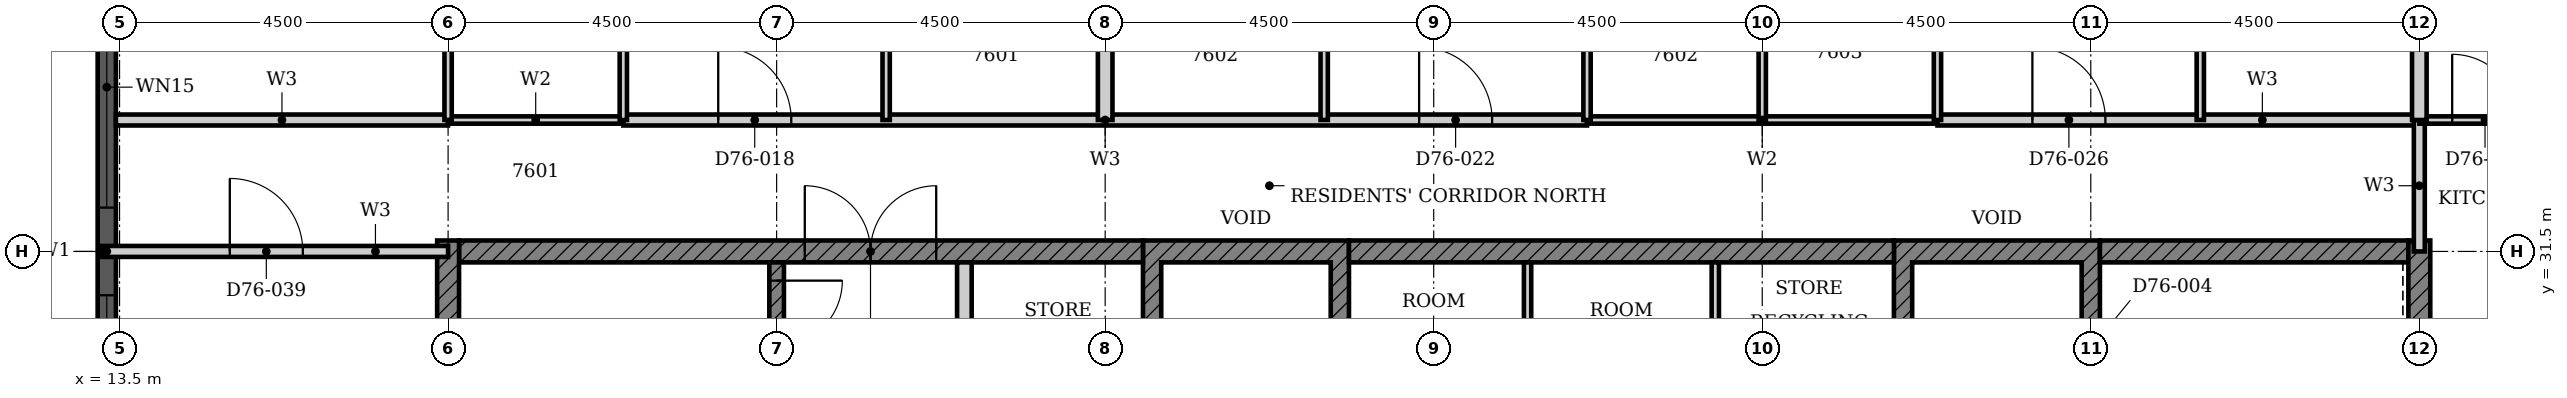
"""IFC4 building model, lengths in metres.
Left out: names, types, materials, properties, quantities, classifications, styles, units other than length and angle.
Written with IfcOpenShell. Run it as: python <this file> out.ifc"""

import sys

from ifc_helpers import new_model, si_unit, direction, frame, frame_2d, origin, place, context, subcontext, project, spatial, polyline, rectangle, outline, extrude, element, fill, save


model = new_model("IFC4")
c1 = context("Model", 3, precision=1e-05, world=origin(), true_north=direction((0.0, 1.0)))
c2 = subcontext(c1, "Body", "Model", "MODEL_VIEW")
j1 = project(units=[si_unit("LENGTHUNIT", "METRE"), si_unit("PLANEANGLEUNIT", "RADIAN")], contexts=[c1])
p1 = place(None, origin())
s1 = spatial("IfcSite", under=j1, at=p1, CompositionType="ELEMENT")
p2 = place(p1, origin())
s2 = spatial("IfcBuilding", under=s1, at=p2, CompositionType="ELEMENT")
p3 = place(p2, frame((0.0, 0.0, 298.2)))
s3 = spatial("IfcBuildingStorey", under=s2, at=p3, CompositionType="ELEMENT", Elevation=298.2)
p4 = place(p3, frame((13.325, 35.7, 0.0), z_axis=(0.0, 0.0, 1.0), x_axis=(0.0, -1.0, 0.0)))
e1 = element("IfcWall", 1, at=p4, inside=s3, PredefinedType="SOLIDWALL", context=c2, shape_type="SweptSolid", body=[
    extrude(rectangle(XDim=8.4, YDim=0.25, at=frame_2d((4.2, 0.0))), origin(), (0.0, 0.0, 1.0), 3.7),
])
p5 = place(p4, frame((0.3, 0.0, 0.45)))
e2 = element("IfcOpeningElement", 2, at=p5, cuts=e1, PredefinedType="OPENING", context=c2, shape_type="SweptSolid", body=[
    extrude(rectangle(XDim=3.3, YDim=2.3, at=frame_2d((1.65, 1.15))), frame((0.0, 0.135, 0.0), z_axis=(0.0, -1.0, 0.0), x_axis=(1.0, 0.0, 0.0)), (0.0, 0.0, 1.0), 0.27),
])
p6 = place(p4, frame((4.8, 0.0, 0.45)))
e3 = element("IfcOpeningElement", 3, at=p6, cuts=e1, PredefinedType="OPENING", context=c2, shape_type="SweptSolid", body=[
    extrude(rectangle(XDim=3.3, YDim=2.3, at=frame_2d((1.65, 1.15))), frame((0.0, 0.135, 0.0), z_axis=(0.0, -1.0, 0.0), x_axis=(1.0, 0.0, 0.0)), (0.0, 0.0, 1.0), 0.27),
])
p7 = place(p3, origin())
e4 = element("IfcWall", 4, at=p7, inside=s3, PredefinedType="SHEAR", context=c2, shape_type="SweptSolid", body=[
    extrude(outline(polyline([(27.518, 28.725), (27.768, 28.725), (27.768, 31.35), (30.089, 31.35), (30.089, 28.725), (30.339, 28.725), (30.339, 31.65), (27.518, 31.65), (27.518, 28.725)])), origin(), (0.0, 0.0, 1.0), 3.4),
])
p8 = place(p3, origin())
e5 = element("IfcWall", 5, at=p8, inside=s3, PredefinedType="SHEAR", context=c2, shape_type="SweptSolid", body=[
    extrude(outline(polyline([(37.803, 28.725), (38.053, 28.725), (38.053, 31.35), (40.375, 31.35), (40.375, 28.725), (40.625, 28.725), (40.625, 31.65), (37.803, 31.65), (37.803, 28.725)])), origin(), (0.0, 0.0, 1.0), 3.4),
])
p9 = place(p3, frame((18.15, 31.5, 0.0), z_axis=(0.0, 0.0, 1.0), x_axis=(1.0, 0.0, 0.0)))
e6 = element("IfcWall", 6, at=p9, inside=s3, PredefinedType="SHEAR", context=c2, shape_type="SweptSolid", body=[
    extrude(rectangle(XDim=9.368, YDim=0.3, at=frame_2d((4.684, 0.0))), origin(), (0.0, 0.0, 1.0), 3.4),
])
p10 = place(p9, frame((4.736, 0.0, 0.0)))
e7 = element("IfcOpeningElement", 7, at=p10, cuts=e6, PredefinedType="OPENING", context=c2, shape_type="SweptSolid", body=[
    extrude(rectangle(XDim=1.8, YDim=2.1, at=frame_2d((0.9, 1.05))), frame((0.0, 0.16, 0.0), z_axis=(0.0, -1.0, 0.0), x_axis=(1.0, 0.0, 0.0)), (0.0, 0.0, 1.0), 0.32),
])
p11 = place(p3, frame((30.339, 31.5, 0.0), z_axis=(0.0, 0.0, 1.0), x_axis=(1.0, 0.0, 0.0)))
e8 = element("IfcWall", 8, at=p11, inside=s3, PredefinedType="SHEAR", context=c2, shape_type="SweptSolid", body=[
    extrude(rectangle(XDim=7.464, YDim=0.3, at=frame_2d((3.732, 0.0))), origin(), (0.0, 0.0, 1.0), 3.4),
])
p12 = place(p3, frame((40.625, 31.5, 0.0), z_axis=(0.0, 0.0, 1.0), x_axis=(1.0, 0.0, 0.0)))
e9 = element("IfcWall", 9, at=p12, inside=s3, PredefinedType="SHEAR", context=c2, shape_type="SweptSolid", body=[
    extrude(rectangle(XDim=4.225, YDim=0.3, at=frame_2d((2.113, 0.0))), origin(), (0.0, 0.0, 1.0), 3.4),
])
for number, where, z_axis, x_axis in (
    (10, (18.0, 22.35, 0.0), (0.0, 0.0, 1.0), (0.0, 1.0, 0.0)),
    (11, (45.0, 22.35, 0.0), (0.0, 0.0, 1.0), (0.0, 1.0, 0.0)),
):
    element("IfcWall", number, at=place(p3, frame(where, z_axis=z_axis, x_axis=x_axis)), inside=s3, PredefinedType="SHEAR", context=c2, shape_type="SweptSolid", body=[
        extrude(rectangle(XDim=9.3, YDim=0.3, at=frame_2d((4.65, 0.0))), origin(), (0.0, 0.0, 1.0), 3.4),
    ])
p13 = place(p3, frame((25.072, 28.725, 0.0), z_axis=(0.0, 0.0, 1.0), x_axis=(0.0, 1.0, 0.0)))
e12 = element("IfcWall", 12, at=p13, inside=s3, PredefinedType="PARTITIONING", context=c2, shape_type="SweptSolid", body=[
    extrude(rectangle(XDim=2.625, YDim=0.2, at=frame_2d((1.312, 0.0))), origin(), (0.0, 0.0, 1.0), 3.4),
])
for number, where, z_axis, x_axis in (
    (13, (32.786, 28.725, 0.0), (0.0, 0.0, 1.0), (0.0, 1.0, 0.0)),
    (14, (35.357, 28.725, 0.0), (0.0, 0.0, 1.0), (0.0, 1.0, 0.0)),
):
    element("IfcWall", number, at=place(p3, frame(where, z_axis=z_axis, x_axis=x_axis)), inside=s3, PredefinedType="PARTITIONING", context=c2, shape_type="SweptSolid", body=[
        extrude(rectangle(XDim=2.625, YDim=0.1, at=frame_2d((1.312, 0.0))), origin(), (0.0, 0.0, 1.0), 3.4),
    ])
p14 = place(p3, frame((22.5, 31.35, 0.0), z_axis=(0.0, 0.0, 1.0), x_axis=(0.0, -1.0, 0.0)))
e15 = element("IfcWall", 15, at=p14, inside=s3, PredefinedType="SHEAR", context=c2, shape_type="SweptSolid", body=[
    extrude(rectangle(XDim=5.825, YDim=0.2, at=frame_2d((2.913, 0.0))), origin(), (0.0, 0.0, 1.0), 3.4),
])
p15 = place(p14, frame((0.25, 0.0, 0.0)))
e16 = element("IfcOpeningElement", 16, at=p15, cuts=e15, PredefinedType="OPENING", context=c2, shape_type="SweptSolid", body=[
    extrude(rectangle(XDim=1.8, YDim=2.1, at=frame_2d((0.9, 1.05))), frame((0.0, 0.11, 0.0), z_axis=(0.0, -1.0, 0.0), x_axis=(1.0, 0.0, 0.0)), (0.0, 0.0, 1.0), 0.22),
])
p16 = place(p3, frame((13.26, 31.5, 0.0), z_axis=(0.0, 0.0, 1.0), x_axis=(1.0, 0.0, 0.0)))
e17 = element("IfcWall", 17, at=p16, inside=s3, PredefinedType="PARTITIONING", context=c2, shape_type="SweptSolid", body=[
    extrude(rectangle(XDim=4.74, YDim=0.15, at=frame_2d((2.37, 0.0))), origin(), (0.0, 0.0, 1.0), 3.4),
])
p17 = place(p16, frame((1.75, 0.0, 0.0)))
e18 = element("IfcOpeningElement", 18, at=p17, cuts=e17, PredefinedType="OPENING", context=c2, shape_type="SweptSolid", body=[
    extrude(rectangle(XDim=1.0, YDim=2.2, at=frame_2d((0.5, 1.1))), frame((0.0, 0.085, 0.0), z_axis=(0.0, -1.0, 0.0), x_axis=(1.0, 0.0, 0.0)), (0.0, 0.0, 1.0), 0.17),
])
p18 = place(p3, frame((13.45, 33.3, 0.0), z_axis=(0.0, 0.0, 1.0), x_axis=(1.0, 0.0, 0.0)))
e19 = element("IfcWall", 19, at=p18, inside=s3, PredefinedType="PARTITIONING", context=c2, shape_type="SweptSolid", body=[
    extrude(rectangle(XDim=4.549, YDim=0.15, at=frame_2d((2.274, 0.0))), origin(), (0.0, 0.0, 1.0), 3.4),
])
p19 = place(p3, frame((20.4, 33.3, 0.0), z_axis=(0.0, 0.0, 1.0), x_axis=(1.0, 0.0, 0.0)))
e20 = element("IfcWall", 20, at=p19, inside=s3, PredefinedType="PARTITIONING", context=c2, shape_type="SweptSolid", body=[
    extrude(rectangle(XDim=13.2, YDim=0.15, at=frame_2d((6.6, 0.0))), origin(), (0.0, 0.0, 1.0), 3.4),
])
p20 = place(p19, frame((1.3, 0.0, 0.0)))
e21 = element("IfcOpeningElement", 21, at=p20, cuts=e20, PredefinedType="OPENING", context=c2, shape_type="SweptSolid", body=[
    extrude(rectangle(XDim=1.0, YDim=2.2, at=frame_2d((0.5, 1.1))), frame((0.0, 0.085, 0.0), z_axis=(0.0, -1.0, 0.0), x_axis=(1.0, 0.0, 0.0)), (0.0, 0.0, 1.0), 0.17),
])
p21 = place(p19, frame((10.9, 0.0, 0.0)))
e22 = element("IfcOpeningElement", 22, at=p21, cuts=e20, PredefinedType="OPENING", context=c2, shape_type="SweptSolid", body=[
    extrude(rectangle(XDim=1.0, YDim=2.2, at=frame_2d((0.5, 1.1))), frame((0.0, 0.085, 0.0), z_axis=(0.0, -1.0, 0.0), x_axis=(1.0, 0.0, 0.0)), (0.0, 0.0, 1.0), 0.17),
])
p22 = place(p3, frame((38.4, 33.3, 0.0), z_axis=(0.0, 0.0, 1.0), x_axis=(1.0, 0.0, 0.0)))
e23 = element("IfcWall", 23, at=p22, inside=s3, PredefinedType="PARTITIONING", context=c2, shape_type="SweptSolid", body=[
    extrude(rectangle(XDim=6.6, YDim=0.15, at=frame_2d((3.3, 0.0))), origin(), (0.0, 0.0, 1.0), 3.4),
])
p23 = place(p22, frame((1.3, 0.0, 0.0)))
e24 = element("IfcOpeningElement", 24, at=p23, cuts=e23, PredefinedType="OPENING", context=c2, shape_type="SweptSolid", body=[
    extrude(rectangle(XDim=1.0, YDim=2.2, at=frame_2d((0.5, 1.1))), frame((0.0, 0.085, 0.0), z_axis=(0.0, -1.0, 0.0), x_axis=(1.0, 0.0, 0.0)), (0.0, 0.0, 1.0), 0.17),
])
p24 = place(p3, frame((45.0, 31.5, 0.0), z_axis=(0.0, 0.0, 1.0), x_axis=(0.0, 1.0, 0.0)))
e25 = element("IfcWall", 25, at=p24, inside=s3, PredefinedType="PARTITIONING", context=c2, shape_type="SweptSolid", body=[
    extrude(rectangle(XDim=1.8, YDim=0.15, at=frame_2d((0.9, 0.0))), origin(), (0.0, 0.0, 1.0), 3.4),
])
p25 = place(p3, frame((45.0, 33.3, 0.0), z_axis=(0.0, 0.0, 1.0), x_axis=(1.0, 0.0, 0.0)))
e26 = element("IfcWall", 26, at=p25, inside=s3, PredefinedType="PARTITIONING", context=c2, shape_type="SweptSolid", body=[
    extrude(rectangle(XDim=1.8, YDim=0.1, at=frame_2d((0.9, 0.0))), origin(), (0.0, 0.0, 1.0), 3.4),
])
p26 = place(p25, frame((0.45, 0.0, 0.0)))
e27 = element("IfcOpeningElement", 27, at=p26, cuts=e26, PredefinedType="OPENING", context=c2, shape_type="SweptSolid", body=[
    extrude(rectangle(XDim=0.9, YDim=2.1, at=frame_2d((0.45, 1.05))), frame((0.0, 0.06, 0.0), z_axis=(0.0, -1.0, 0.0), x_axis=(1.0, 0.0, 0.0)), (0.0, 0.0, 1.0), 0.12),
])
for number, where, z_axis, x_axis in (
    (28, (24.0, 33.3, 0.0), (0.0, 0.0, 1.0), (0.0, 1.0, 0.0)),
    (29, (30.0, 33.3, 0.0), (0.0, 0.0, 1.0), (0.0, 1.0, 0.0)),
    (30, (42.0, 33.3, 0.0), (0.0, 0.0, 1.0), (0.0, 1.0, 0.0)),
):
    element("IfcWall", number, at=place(p3, frame(where, z_axis=z_axis, x_axis=x_axis)), inside=s3, PredefinedType="PARTITIONING", context=c2, shape_type="SweptSolid", body=[
        extrude(rectangle(XDim=2.7, YDim=0.1, at=frame_2d((1.35, 0.0))), origin(), (0.0, 0.0, 1.0), 3.4),
    ])
p27 = place(p3, frame((27.0, 33.3, 0.0), z_axis=(0.0, 0.0, 1.0), x_axis=(0.0, 1.0, 0.0)))
e31 = element("IfcWall", 31, at=p27, inside=s3, PredefinedType="PARTITIONING", context=c2, shape_type="SweptSolid", body=[
    extrude(rectangle(XDim=7.39, YDim=0.2, at=frame_2d((3.695, 0.0))), origin(), (0.0, 0.0, 1.0), 3.4),
])
p28 = place(p3, frame((45.0, 33.3, 0.0), z_axis=(0.0, 0.0, 1.0), x_axis=(0.0, 1.0, 0.0)))
e32 = element("IfcWall", 32, at=p28, inside=s3, PredefinedType="PARTITIONING", context=c2, shape_type="SweptSolid", body=[
    extrude(rectangle(XDim=4.9, YDim=0.2, at=frame_2d((2.45, 0.0))), origin(), (0.0, 0.0, 1.0), 3.4),
])
p29 = place(p3, frame((18.0, 33.3, 0.0), z_axis=(0.0, 0.0, 1.0), x_axis=(1.0, 0.0, 0.0)))
e33 = element("IfcWall", 33, at=p29, inside=s3, PredefinedType="PARTITIONING", context=c2, shape_type="SweptSolid", body=[
    extrude(rectangle(XDim=2.4, YDim=0.1, at=frame_2d((1.2, 0.0))), origin(), (0.0, 0.0, 1.0), 3.4),
])
p30 = place(p3, frame((33.6, 33.3, 0.0), z_axis=(0.0, 0.0, 1.0), x_axis=(1.0, 0.0, 0.0)))
e34 = element("IfcWall", 34, at=p30, inside=s3, PredefinedType="PARTITIONING", context=c2, shape_type="SweptSolid", body=[
    extrude(rectangle(XDim=4.8, YDim=0.1, at=frame_2d((2.4, 0.0))), origin(), (0.0, 0.0, 1.0), 3.4),
])
p31 = place(p3, frame((18.0, 33.301, 0.0), z_axis=(0.0, 0.0, 1.0), x_axis=(0.0, 1.0, 0.0)))
e35 = element("IfcWall", 35, at=p31, inside=s3, PredefinedType="PARTITIONING", context=c2, shape_type="SweptSolid", body=[
    extrude(rectangle(XDim=2.699, YDim=0.1, at=frame_2d((1.35, 0.0))), origin(), (0.0, 0.0, 1.0), 3.4),
])
p32 = place(p3, frame((20.4, 33.3, 0.0), z_axis=(0.0, 0.0, 1.0), x_axis=(0.0, 1.0, 0.0)))
e36 = element("IfcWall", 36, at=p32, inside=s3, PredefinedType="PARTITIONING", context=c2, shape_type="SweptSolid", body=[
    extrude(rectangle(XDim=2.7, YDim=0.1, at=frame_2d((1.35, 0.0))), origin(), (0.0, 0.0, 1.0), 3.4),
])
p33 = place(p32, frame((0.95, 0.0, 0.0)))
e37 = element("IfcOpeningElement", 37, at=p33, cuts=e36, PredefinedType="OPENING", context=c2, shape_type="SweptSolid", body=[
    extrude(rectangle(XDim=0.8, YDim=2.1, at=frame_2d((0.4, 1.05))), frame((0.0, 0.06, 0.0), z_axis=(0.0, -1.0, 0.0), x_axis=(1.0, 0.0, 0.0)), (0.0, 0.0, 1.0), 0.12),
])
p34 = place(p3, frame((33.6, 33.3, 0.0), z_axis=(0.0, 0.0, 1.0), x_axis=(0.0, 1.0, 0.0)))
e38 = element("IfcWall", 38, at=p34, inside=s3, PredefinedType="PARTITIONING", context=c2, shape_type="SweptSolid", body=[
    extrude(rectangle(XDim=2.7, YDim=0.1, at=frame_2d((1.35, 0.0))), origin(), (0.0, 0.0, 1.0), 3.4),
])
p35 = place(p34, frame((0.95, 0.0, 0.0)))
e39 = element("IfcOpeningElement", 39, at=p35, cuts=e38, PredefinedType="OPENING", context=c2, shape_type="SweptSolid", body=[
    extrude(rectangle(XDim=0.8, YDim=2.1, at=frame_2d((0.4, 1.05))), frame((0.0, 0.06, 0.0), z_axis=(0.0, -1.0, 0.0), x_axis=(1.0, 0.0, 0.0)), (0.0, 0.0, 1.0), 0.12),
])
p36 = place(p3, frame((36.0, 33.3, 0.0), z_axis=(0.0, 0.0, 1.0), x_axis=(0.0, 1.0, 0.0)))
e40 = element("IfcWall", 40, at=p36, inside=s3, PredefinedType="PARTITIONING", context=c2, shape_type="SweptSolid", body=[
    extrude(rectangle(XDim=2.7, YDim=0.1, at=frame_2d((1.35, 0.0))), origin(), (0.0, 0.0, 1.0), 3.4),
])
p37 = place(p3, frame((38.4, 33.3, 0.0), z_axis=(0.0, 0.0, 1.0), x_axis=(0.0, 1.0, 0.0)))
e41 = element("IfcWall", 41, at=p37, inside=s3, PredefinedType="PARTITIONING", context=c2, shape_type="SweptSolid", body=[
    extrude(rectangle(XDim=2.7, YDim=0.1, at=frame_2d((1.35, 0.0))), origin(), (0.0, 0.0, 1.0), 3.4),
])
p38 = place(p37, frame((0.95, 0.0, 0.0)))
e42 = element("IfcOpeningElement", 42, at=p38, cuts=e41, PredefinedType="OPENING", context=c2, shape_type="SweptSolid", body=[
    extrude(rectangle(XDim=0.8, YDim=2.1, at=frame_2d((0.4, 1.05))), frame((0.0, 0.06, 0.0), z_axis=(0.0, -1.0, 0.0), x_axis=(1.0, 0.0, 0.0)), (0.0, 0.0, 1.0), 0.12),
])
p39 = place(p5, origin())
e43 = element("IfcWindow", 43, at=p39, inside=s3, PartitioningType="SINGLE_PANEL", PredefinedType="WINDOW", context=c2, shape_type="SweptSolid", body=[
    extrude(rectangle(XDim=3.3, YDim=2.3, at=frame_2d((1.65, 1.15))), frame((0.0, 0.03, 0.0), z_axis=(0.0, -1.0, 0.0), x_axis=(1.0, 0.0, 0.0)), (0.0, 0.0, 1.0), 0.06),
])
fill(e2, e43)
p40 = place(p6, origin())
e44 = element("IfcWindow", 44, at=p40, inside=s3, PartitioningType="SINGLE_PANEL", PredefinedType="WINDOW", context=c2, shape_type="SweptSolid", body=[
    extrude(rectangle(XDim=3.3, YDim=2.3, at=frame_2d((1.65, 1.15))), frame((0.0, 0.03, 0.0), z_axis=(0.0, -1.0, 0.0), x_axis=(1.0, 0.0, 0.0)), (0.0, 0.0, 1.0), 0.06),
])
fill(e3, e44)
p41 = place(p15, origin())
e45 = element("IfcDoor", 45, at=p41, inside=s3, OperationType="DOUBLE_DOOR_SINGLE_SWING", PredefinedType="DOOR", context=c2, shape_type="SweptSolid", body=[
    extrude(rectangle(XDim=1.8, YDim=2.1, at=frame_2d((0.9, 1.05))), frame((0.0, 0.025, 0.0), z_axis=(0.0, -1.0, 0.0), x_axis=(1.0, 0.0, 0.0)), (0.0, 0.0, 1.0), 0.05),
])
fill(e16, e45)
p42 = place(p10, origin())
e46 = element("IfcDoor", 46, at=p42, inside=s3, OperationType="DOUBLE_DOOR_SINGLE_SWING", PredefinedType="DOOR", context=c2, shape_type="SweptSolid", body=[
    extrude(rectangle(XDim=1.8, YDim=2.1, at=frame_2d((0.9, 1.05))), frame((0.0, 0.025, 0.0), z_axis=(0.0, -1.0, 0.0), x_axis=(1.0, 0.0, 0.0)), (0.0, 0.0, 1.0), 0.05),
])
fill(e7, e46)
p43 = place(p20, origin())
e47 = element("IfcDoor", 47, at=p43, inside=s3, OperationType="SINGLE_SWING_RIGHT", PredefinedType="DOOR", context=c2, shape_type="SweptSolid", body=[
    extrude(rectangle(XDim=1.0, YDim=2.2, at=frame_2d((0.5, 1.1))), frame((0.0, 0.025, 0.0), z_axis=(0.0, -1.0, 0.0), x_axis=(1.0, 0.0, 0.0)), (0.0, 0.0, 1.0), 0.05),
])
fill(e21, e47)
p44 = place(p21, origin())
e48 = element("IfcDoor", 48, at=p44, inside=s3, OperationType="SINGLE_SWING_RIGHT", PredefinedType="DOOR", context=c2, shape_type="SweptSolid", body=[
    extrude(rectangle(XDim=1.0, YDim=2.2, at=frame_2d((0.5, 1.1))), frame((0.0, 0.025, 0.0), z_axis=(0.0, -1.0, 0.0), x_axis=(1.0, 0.0, 0.0)), (0.0, 0.0, 1.0), 0.05),
])
fill(e22, e48)
p45 = place(p23, origin())
e49 = element("IfcDoor", 49, at=p45, inside=s3, OperationType="SINGLE_SWING_RIGHT", PredefinedType="DOOR", context=c2, shape_type="SweptSolid", body=[
    extrude(rectangle(XDim=1.0, YDim=2.2, at=frame_2d((0.5, 1.1))), frame((0.0, 0.025, 0.0), z_axis=(0.0, -1.0, 0.0), x_axis=(1.0, 0.0, 0.0)), (0.0, 0.0, 1.0), 0.05),
])
fill(e24, e49)
p46 = place(p17, origin())
e50 = element("IfcDoor", 50, at=p46, inside=s3, OperationType="SINGLE_SWING_LEFT", PredefinedType="DOOR", context=c2, shape_type="SweptSolid", body=[
    extrude(rectangle(XDim=1.0, YDim=2.2, at=frame_2d((0.5, 1.1))), frame((0.0, 0.025, 0.0), z_axis=(0.0, -1.0, 0.0), x_axis=(1.0, 0.0, 0.0)), (0.0, 0.0, 1.0), 0.05),
])
fill(e18, e50)
p47 = place(p26, origin())
e51 = element("IfcDoor", 51, at=p47, inside=s3, OperationType="SINGLE_SWING_RIGHT", PredefinedType="DOOR", context=c2, shape_type="SweptSolid", body=[
    extrude(rectangle(XDim=0.9, YDim=2.1, at=frame_2d((0.45, 1.05))), frame((0.0, 0.025, 0.0), z_axis=(0.0, -1.0, 0.0), x_axis=(1.0, 0.0, 0.0)), (0.0, 0.0, 1.0), 0.05),
])
fill(e27, e51)
save(model, sys.argv[1])
